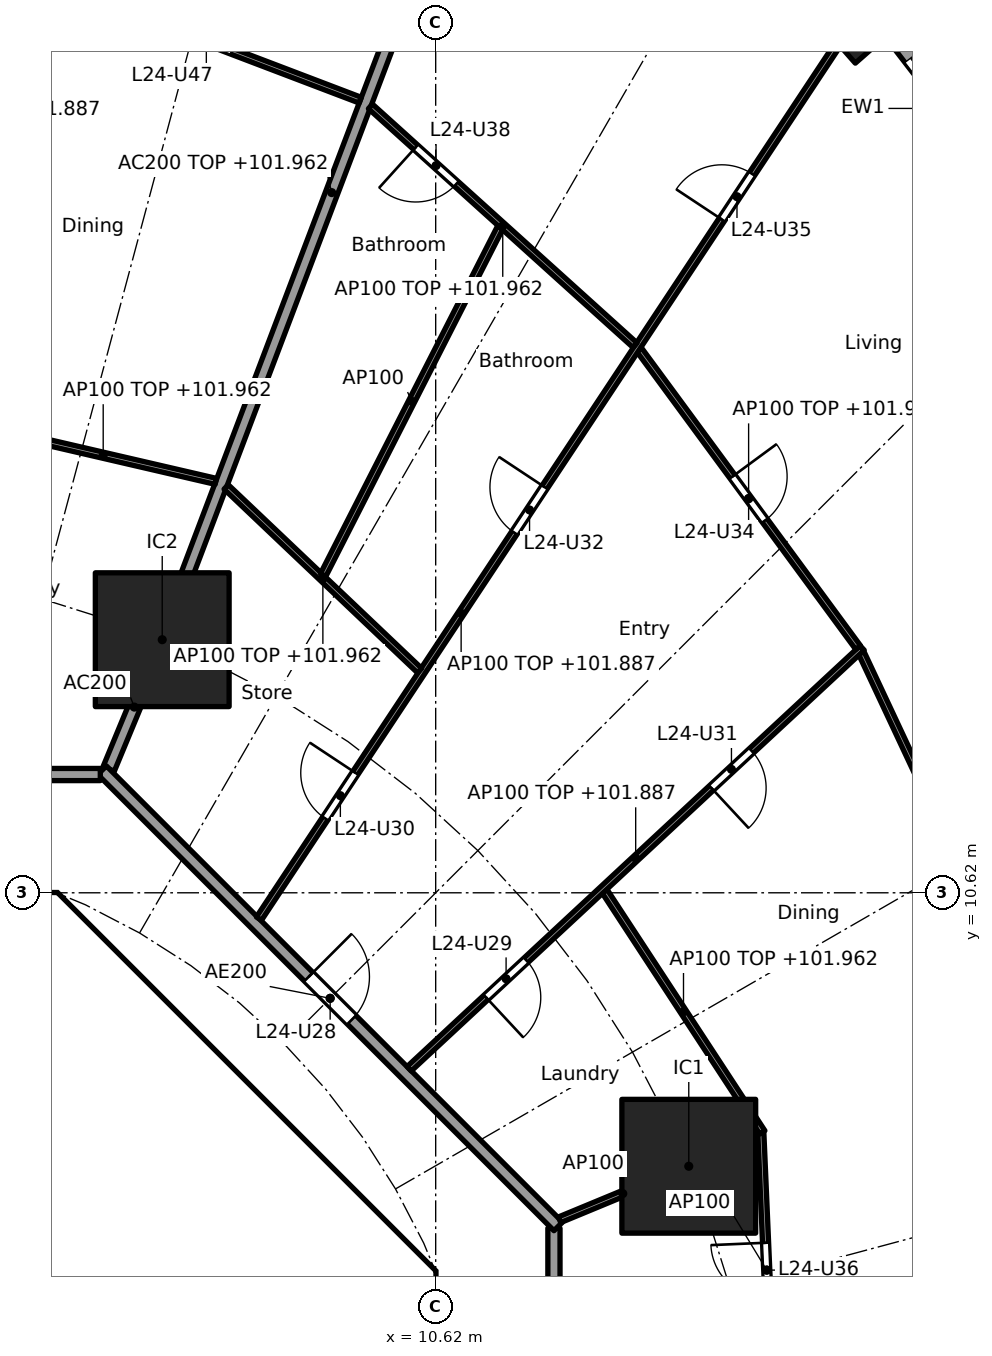
"""IFC4 building model, lengths in metres.
Left out: names, types, materials, properties, quantities, classifications, styles, units other than length and angle.
Written with IfcOpenShell. Run it as: python <this file> out.ifc"""

import sys

from ifc_helpers import new_model, si_unit, direction, frame, frame_2d, origin, origin_2d, place, context, subcontext, project, spatial, polyline, rectangle, hollow_rectangle, outline, extrude, element, fill, save


model = new_model("IFC4")
c1 = context("Model", 3, precision=1e-05, world=origin(), true_north=direction((0.0, 1.0)))
c2 = subcontext(c1, "Body", "Model", "MODEL_VIEW")
j1 = project(units=[si_unit("LENGTHUNIT", "METRE"), si_unit("PLANEANGLEUNIT", "RADIAN")], contexts=[c1])
p1 = place(None, origin())
s1 = spatial("IfcSite", under=j1, at=p1, CompositionType="ELEMENT")
p2 = place(p1, origin())
s2 = spatial("IfcBuilding", under=s1, at=p2, CompositionType="ELEMENT")
p3 = place(p2, frame((0.0, 0.0, 99.2)))
s3 = spatial("IfcBuildingStorey", under=s2, at=p3, CompositionType="ELEMENT", Elevation=99.2)
p4 = place(p3, frame((17.43, 25.049, 0.0), z_axis=(0.0, 0.0, 1.0), x_axis=(-0.660114607735, 0.751164898445, 0.0)))
e1 = element("IfcColumn", 1, at=p4, inside=s3, PredefinedType="COLUMN", context=c2, shape_type="SweptSolid", body=[
    extrude(hollow_rectangle(XDim=1.3, YDim=0.9, WallThickness=0.045, at=origin_2d()), origin(), (0.0, 0.0, 1.0), 3.7),
])
for number, where, z_axis, x_axis in (
    (2, (14.782, 6.123, 0.0), (0.0, 0.0, 1.0), (1.0, 0.0, 0.0)),
    (3, (6.123, 14.782, 0.0), (0.0, 0.0, 1.0), (1.0, 0.0, 0.0)),
):
    element("IfcColumn", number, at=place(p3, frame(where, z_axis=z_axis, x_axis=x_axis)), inside=s3, PredefinedType="COLUMN", context=c2, shape_type="SweptSolid", body=[
        extrude(rectangle(XDim=2.2, YDim=2.2, at=origin_2d()), origin(), (0.0, 0.0, 1.0), 3.7),
    ])
p5 = place(p3, frame((18.081, 24.811, 0.0), z_axis=(0.0, 0.0, 1.0), x_axis=(0.610458970322, -0.792047880847, 0.0)))
e4 = element("IfcWall", 4, at=p5, inside=s3, PredefinedType="SOLIDWALL", context=c2, shape_type="SweptSolid", body=[
    extrude(rectangle(XDim=3.263, YDim=0.25, at=frame_2d((1.631, 0.0))), origin(), (0.0, 0.0, 1.0), 3.44),
])
p6 = place(p5, frame((0.582, 0.0, 0.0)))
e5 = element("IfcOpeningElement", 5, at=p6, cuts=e4, PredefinedType="OPENING", context=c2, shape_type="SweptSolid", body=[
    extrude(rectangle(XDim=2.1, YDim=2.4, at=frame_2d((1.05, 1.2))), frame((0.0, 0.135, 0.0), z_axis=(0.0, -1.0, 0.0), x_axis=(1.0, 0.0, 0.0)), (0.0, 0.0, 1.0), 0.27),
])
p7 = place(p3, frame((9.988, 4.613, 0.0), z_axis=(0.0, 0.0, 1.0), x_axis=(-0.707106781187, 0.707106781187, 0.0)))
e6 = element("IfcWall", 6, at=p7, inside=s3, PredefinedType="SHEAR", context=c2, shape_type="SweptSolid", body=[
    extrude(rectangle(XDim=7.602, YDim=0.6, at=frame_2d((3.801, 0.0))), origin(), (0.0, 0.0, 1.0), 3.44),
])
p8 = place(p7, frame((3.201, 0.0, 0.0)))
e7 = element("IfcOpeningElement", 7, at=p8, cuts=e6, PredefinedType="OPENING", context=c2, shape_type="SweptSolid", body=[
    extrude(rectangle(XDim=1.2, YDim=2.1, at=frame_2d((0.6, 1.05))), frame((0.0, 0.31, 0.0), z_axis=(0.0, -1.0, 0.0), x_axis=(1.0, 0.0, 0.0)), (0.0, 0.0, 1.0), 0.62),
])
p9 = place(p3, origin())
e8 = element("IfcWall", 8, at=p9, inside=s3, PredefinedType="SHEAR", context=c2, shape_type="SweptSolid", body=[
    extrude(outline(polyline([(-4.152, 10.025), (-4.401, 9.776), (-4.825, 10.2), (-4.401, 10.625), (4.401, 10.625), (4.825, 10.2), (4.401, 9.776), (4.152, 10.025), (-4.152, 10.025)])), origin(), (0.0, 0.0, 1.0), 3.44),
])
p10 = place(p3, origin())
e9 = element("IfcWall", 9, at=p10, inside=s3, PredefinedType="SHEAR", context=c2, shape_type="SweptSolid", body=[
    extrude(outline(polyline([(9.776, -4.401), (10.025, -4.152), (10.025, -3.801), (10.025, 4.152), (9.776, 4.401), (10.2, 4.825), (10.625, 4.401), (10.625, -4.401), (10.2, -4.825), (9.776, -4.401)])), origin(), (0.0, 0.0, 1.0), 3.44),
])
p11 = place(p3, frame((5.243, 12.657, 0.0), z_axis=(0.0, 0.0, 1.0), x_axis=(0.382724096228, 0.923862687939, 0.0)))
e10 = element("IfcWall", 10, at=p11, inside=s3, PredefinedType="PARTITIONING", context=c2, shape_type="SweptSolid", body=[
    extrude(rectangle(XDim=2.201, YDim=0.2, at=frame_2d((1.1, 0.0))), origin(), (0.0, 0.0, 1.0), 3.44),
])
p12 = place(p3, frame((6.141, 14.829, 0.0), z_axis=(0.0, 0.0, 1.0), x_axis=(0.354477134193, 0.935064682968, 0.0)))
e11 = element("IfcWall", 11, at=p12, inside=s3, PredefinedType="PARTITIONING", context=c2, shape_type="SweptSolid", body=[
    extrude(rectangle(XDim=15.626, YDim=0.2, at=frame_2d((7.813, 0.0))), origin(), (0.0, 0.0, 1.0), 2.762),
])
p13 = place(p3, frame((12.565, -5.104, 0.0), z_axis=(0.0, 0.0, 1.0), x_axis=(0.0, 1.0, 0.0)))
e12 = element("IfcWall", 12, at=p13, inside=s3, PredefinedType="PARTITIONING", context=c2, shape_type="SweptSolid", body=[
    extrude(rectangle(XDim=10.209, YDim=0.2, at=frame_2d((5.104, 0.0))), origin(), (0.0, 0.0, 1.0), 3.44),
])
p14 = place(p3, frame((12.635, 5.134, 0.0), z_axis=(0.0, 0.0, 1.0), x_axis=(-0.707106781187, 0.707106781187, 0.0)))
e13 = element("IfcWall", 13, at=p14, inside=s3, PredefinedType="PARTITIONING", context=c2, shape_type="SweptSolid", body=[
    extrude(rectangle(XDim=10.609, YDim=0.2, at=frame_2d((5.305, 0.0))), origin(), (0.0, 0.0, 1.0), 3.44),
])
p15 = place(p14, frame((4.804, 0.0, 0.0)))
e14 = element("IfcOpeningElement", 14, at=p15, cuts=e13, PredefinedType="OPENING", context=c2, shape_type="SweptSolid", body=[
    extrude(rectangle(XDim=1.0, YDim=2.1, at=frame_2d((0.5, 1.05))), frame((0.0, 0.11, 0.0), z_axis=(0.0, -1.0, 0.0), x_axis=(1.0, 0.0, 0.0)), (0.0, 0.0, 1.0), 0.22),
])
p16 = place(p3, frame((5.104, 12.565, 0.0), z_axis=(0.0, 0.0, 1.0), x_axis=(-1.0, 0.0, 0.0)))
e15 = element("IfcWall", 15, at=p16, inside=s3, PredefinedType="PARTITIONING", context=c2, shape_type="SweptSolid", body=[
    extrude(rectangle(XDim=10.409, YDim=0.2, at=frame_2d((5.205, 0.0))), origin(), (0.0, 0.0, 1.0), 3.44),
])
p17 = place(p16, frame((4.604, 0.0, 0.0)))
e16 = element("IfcOpeningElement", 16, at=p17, cuts=e15, PredefinedType="OPENING", context=c2, shape_type="SweptSolid", body=[
    extrude(rectangle(XDim=1.0, YDim=2.1, at=frame_2d((0.5, 1.05))), frame((0.0, 0.11, 0.0), z_axis=(0.0, -1.0, 0.0), x_axis=(1.0, 0.0, 0.0)), (0.0, 0.0, 1.0), 0.22),
])
p18 = place(p3, frame((16.162, 2.158, 0.0), z_axis=(0.0, 0.0, 1.0), x_axis=(-0.043120653248, 0.999069872063, 0.0)))
e17 = element("IfcWall", 17, at=p18, inside=s3, PredefinedType="PARTITIONING", context=c2, shape_type="SweptSolid", body=[
    extrude(rectangle(XDim=4.518, YDim=0.1, at=frame_2d((2.259, 0.0))), origin(), (0.0, 0.0, 1.0), 3.44),
])
p19 = place(p18, frame((1.809, 0.0, 0.0)))
e18 = element("IfcOpeningElement", 18, at=p19, cuts=e17, PredefinedType="OPENING", context=c2, shape_type="SweptSolid", body=[
    extrude(rectangle(XDim=0.9, YDim=2.1, at=frame_2d((0.45, 1.05))), frame((0.0, 0.06, 0.0), z_axis=(0.0, -1.0, 0.0), x_axis=(1.0, 0.0, 0.0)), (0.0, 0.0, 1.0), 0.12),
])
p20 = place(p3, frame((12.657, 5.243, 0.0), z_axis=(0.0, 0.0, 1.0), x_axis=(0.923864733477, 0.382719158442, 0.0)))
e19 = element("IfcWall", 19, at=p20, inside=s3, PredefinedType="PARTITIONING", context=c2, shape_type="SweptSolid", body=[
    extrude(rectangle(XDim=2.25, YDim=0.1, at=frame_2d((1.125, 0.0))), origin(), (0.0, 0.0, 1.0), 3.44),
])
p21 = place(p3, frame((15.992, 6.68, 0.0), z_axis=(0.0, 0.0, 1.0), x_axis=(-0.547472878942, 0.836823426311, 0.0)))
e20 = element("IfcWall", 20, at=p21, inside=s3, PredefinedType="PARTITIONING", context=c2, shape_type="SweptSolid", body=[
    extrude(rectangle(XDim=4.738, YDim=0.1, at=frame_2d((2.369, 0.0))), origin(), (0.0, 0.0, 1.0), 2.762),
])
p22 = place(p3, frame((20.252, 8.95, 0.0), z_axis=(0.0, 0.0, 1.0), x_axis=(-0.424580052627, 0.90539040138, 0.0)))
e21 = element("IfcWall", 21, at=p22, inside=s3, PredefinedType="PARTITIONING", context=c2, shape_type="SweptSolid", body=[
    extrude(rectangle(XDim=6.204, YDim=0.1, at=frame_2d((3.102, 0.0))), origin(), (0.0, 0.0, 1.0), 2.762),
])
p23 = place(p3, frame((10.185, 7.726, 0.0), z_axis=(0.0, 0.0, 1.0), x_axis=(0.732598472978, 0.680661059112, 0.0)))
e22 = element("IfcWall", 22, at=p23, inside=s3, PredefinedType="PARTITIONING", context=c2, shape_type="SweptSolid", body=[
    extrude(rectangle(XDim=10.167, YDim=0.1, at=frame_2d((5.084, 0.0))), origin(), (0.0, 0.0, 1.0), 2.687),
])
p24 = place(p23, frame((1.725, 0.0, 0.0)))
e23 = element("IfcOpeningElement", 23, at=p24, cuts=e22, PredefinedType="OPENING", context=c2, shape_type="SweptSolid", body=[
    extrude(rectangle(XDim=0.9, YDim=2.1, at=frame_2d((0.45, 1.05))), frame((0.0, 0.06, 0.0), z_axis=(0.0, -1.0, 0.0), x_axis=(1.0, 0.0, 0.0)), (0.0, 0.0, 1.0), 0.12),
])
p25 = place(p23, frame((6.784, 0.0, 0.0)))
e24 = element("IfcOpeningElement", 24, at=p25, cuts=e22, PredefinedType="OPENING", context=c2, shape_type="SweptSolid", body=[
    extrude(rectangle(XDim=0.9, YDim=2.1, at=frame_2d((0.45, 1.05))), frame((0.0, 0.06, 0.0), z_axis=(0.0, -1.0, 0.0), x_axis=(1.0, 0.0, 0.0)), (0.0, 0.0, 1.0), 0.12),
])
p26 = place(p3, frame((17.567, 14.653, 0.0), z_axis=(0.0, 0.0, 1.0), x_axis=(-0.592391983588, 0.80564988536, 0.0)))
e25 = element("IfcWall", 25, at=p26, inside=s3, PredefinedType="PARTITIONING", context=c2, shape_type="SweptSolid", body=[
    extrude(rectangle(XDim=6.08, YDim=0.1, at=frame_2d((3.04, 0.0))), origin(), (0.0, 0.0, 1.0), 2.762),
])
p27 = place(p26, frame((2.59, 0.0, 0.0)))
e26 = element("IfcOpeningElement", 26, at=p27, cuts=e25, PredefinedType="OPENING", context=c2, shape_type="SweptSolid", body=[
    extrude(rectangle(XDim=0.9, YDim=2.1, at=frame_2d((0.45, 1.05))), frame((0.0, 0.06, 0.0), z_axis=(0.0, -1.0, 0.0), x_axis=(1.0, 0.0, 0.0)), (0.0, 0.0, 1.0), 0.12),
])
p28 = place(p3, frame((7.713, 10.195, 0.0), z_axis=(0.0, 0.0, 1.0), x_axis=(0.552111071171, 0.833770571015, 0.0)))
e27 = element("IfcWall", 27, at=p28, inside=s3, PredefinedType="PARTITIONING", context=c2, shape_type="SweptSolid", body=[
    extrude(rectangle(XDim=17.208, YDim=0.1, at=frame_2d((8.604, 0.0))), origin(), (0.0, 0.0, 1.0), 2.687),
])
p29 = place(p28, frame((1.976, 0.0, 0.0)))
e28 = element("IfcOpeningElement", 28, at=p29, cuts=e27, PredefinedType="OPENING", context=c2, shape_type="SweptSolid", body=[
    extrude(rectangle(XDim=0.9, YDim=2.1, at=frame_2d((0.45, 1.05))), frame((0.0, 0.06, 0.0), z_axis=(0.0, -1.0, 0.0), x_axis=(1.0, 0.0, 0.0)), (0.0, 0.0, 1.0), 0.12),
])
p30 = place(p28, frame((7.611, 0.0, 0.0)))
e29 = element("IfcOpeningElement", 29, at=p30, cuts=e27, PredefinedType="OPENING", context=c2, shape_type="SweptSolid", body=[
    extrude(rectangle(XDim=0.9, YDim=2.1, at=frame_2d((0.45, 1.05))), frame((0.0, 0.06, 0.0), z_axis=(0.0, -1.0, 0.0), x_axis=(1.0, 0.0, 0.0)), (0.0, 0.0, 1.0), 0.12),
])
p31 = place(p28, frame((13.79, 0.0, 0.0)))
e30 = element("IfcOpeningElement", 30, at=p31, cuts=e27, PredefinedType="OPENING", context=c2, shape_type="SweptSolid", body=[
    extrude(rectangle(XDim=0.9, YDim=2.1, at=frame_2d((0.45, 1.05))), frame((0.0, 0.06, 0.0), z_axis=(0.0, -1.0, 0.0), x_axis=(1.0, 0.0, 0.0)), (0.0, 0.0, 1.0), 0.12),
])
p32 = place(p3, frame((10.355, 14.274, 0.0), z_axis=(0.0, 0.0, 1.0), x_axis=(-0.725206433622, 0.688531501555, 0.0)))
e31 = element("IfcWall", 31, at=p32, inside=s3, PredefinedType="PARTITIONING", context=c2, shape_type="SweptSolid", body=[
    extrude(rectangle(XDim=4.387, YDim=0.1, at=frame_2d((2.193, 0.0))), origin(), (0.0, 0.0, 1.0), 2.762),
])
p33 = place(p3, frame((13.898, 19.625, 0.0), z_axis=(0.0, 0.0, 1.0), x_axis=(-0.742396654702, 0.669960601146, 0.0)))
e32 = element("IfcWall", 32, at=p33, inside=s3, PredefinedType="PARTITIONING", context=c2, shape_type="SweptSolid", body=[
    extrude(rectangle(XDim=5.861, YDim=0.1, at=frame_2d((2.931, 0.0))), origin(), (0.0, 0.0, 1.0), 2.762),
])
p34 = place(p33, frame((3.958, 0.0, 0.0)))
e33 = element("IfcOpeningElement", 33, at=p34, cuts=e32, PredefinedType="OPENING", context=c2, shape_type="SweptSolid", body=[
    extrude(rectangle(XDim=0.9, YDim=2.1, at=frame_2d((0.45, 1.05))), frame((0.0, 0.06, 0.0), z_axis=(0.0, -1.0, 0.0), x_axis=(1.0, 0.0, 0.0)), (0.0, 0.0, 1.0), 0.12),
])
p35 = place(p3, frame((8.769, 15.846, 0.0), z_axis=(0.0, 0.0, 1.0), x_axis=(0.454067187552, 0.890967445639, 0.0)))
e34 = element("IfcWall", 34, at=p35, inside=s3, PredefinedType="PARTITIONING", context=c2, shape_type="SweptSolid", body=[
    extrude(rectangle(XDim=6.414, YDim=0.1, at=frame_2d((3.207, 0.0))), origin(), (0.0, 0.0, 1.0), 3.44),
])
p36 = place(p3, frame((7.004, 17.386, 0.0), z_axis=(0.0, 0.0, 1.0), x_axis=(-0.974179728512, 0.225773905837, 0.0)))
e35 = element("IfcWall", 35, at=p36, inside=s3, PredefinedType="PARTITIONING", context=c2, shape_type="SweptSolid", body=[
    extrude(rectangle(XDim=3.802, YDim=0.1, at=frame_2d((1.901, 0.0))), origin(), (0.0, 0.0, 1.0), 2.762),
])
p37 = place(p3, frame((9.379, 23.655, 0.0), z_axis=(0.0, 0.0, 1.0), x_axis=(-0.934609369022, 0.355675873986, 0.0)))
e36 = element("IfcWall", 36, at=p37, inside=s3, PredefinedType="PARTITIONING", context=c2, shape_type="SweptSolid", body=[
    extrude(rectangle(XDim=5.467, YDim=0.1, at=frame_2d((2.733, 0.0))), origin(), (0.0, 0.0, 1.0), 2.762),
])
p38 = place(p37, frame((2.258, 0.0, 0.0)))
e37 = element("IfcOpeningElement", 37, at=p38, cuts=e36, PredefinedType="OPENING", context=c2, shape_type="SweptSolid", body=[
    extrude(rectangle(XDim=0.9, YDim=2.1, at=frame_2d((0.45, 1.05))), frame((0.0, 0.06, 0.0), z_axis=(0.0, -1.0, 0.0), x_axis=(1.0, 0.0, 0.0)), (0.0, 0.0, 1.0), 0.12),
])
p39 = place(p6, origin())
e38 = element("IfcDoor", 38, at=p39, inside=s3, OperationType="SLIDING_TO_LEFT", PredefinedType="DOOR", context=c2, shape_type="SweptSolid", body=[
    extrude(rectangle(XDim=2.1, YDim=2.4, at=frame_2d((1.05, 1.2))), frame((0.0, 0.025, 0.0), z_axis=(0.0, -1.0, 0.0), x_axis=(1.0, 0.0, 0.0)), (0.0, 0.0, 1.0), 0.05),
])
fill(e5, e38)
p40 = place(p8, origin())
e39 = element("IfcDoor", 39, at=p40, inside=s3, OperationType="SINGLE_SWING_LEFT", PredefinedType="DOOR", context=c2, shape_type="SweptSolid", body=[
    extrude(rectangle(XDim=1.2, YDim=2.1, at=frame_2d((0.6, 1.05))), frame((0.0, 0.025, 0.0), z_axis=(0.0, -1.0, 0.0), x_axis=(1.0, 0.0, 0.0)), (0.0, 0.0, 1.0), 0.05),
])
fill(e7, e39)
p41 = place(p15, frame((1.0, 0.0, 0.0), x_axis=(-1.0, 0.0, 0.0)))
e40 = element("IfcDoor", 40, at=p41, inside=s3, OperationType="SINGLE_SWING_LEFT", PredefinedType="DOOR", context=c2, shape_type="SweptSolid", body=[
    extrude(rectangle(XDim=1.0, YDim=2.1, at=frame_2d((0.5, 1.05))), frame((0.0, 0.025, 0.0), z_axis=(0.0, -1.0, 0.0), x_axis=(1.0, 0.0, 0.0)), (0.0, 0.0, 1.0), 0.05),
])
fill(e14, e40)
p42 = place(p24, frame((0.9, 0.0, 0.0), x_axis=(-1.0, 0.0, 0.0)))
e41 = element("IfcDoor", 41, at=p42, inside=s3, OperationType="SINGLE_SWING_RIGHT", PredefinedType="DOOR", context=c2, shape_type="SweptSolid", body=[
    extrude(rectangle(XDim=0.9, YDim=2.1, at=frame_2d((0.45, 1.05))), frame((0.0, 0.025, 0.0), z_axis=(0.0, -1.0, 0.0), x_axis=(1.0, 0.0, 0.0)), (0.0, 0.0, 1.0), 0.05),
])
fill(e23, e41)
p43 = place(p29, origin())
e42 = element("IfcDoor", 42, at=p43, inside=s3, OperationType="SINGLE_SWING_RIGHT", PredefinedType="DOOR", context=c2, shape_type="SweptSolid", body=[
    extrude(rectangle(XDim=0.9, YDim=2.1, at=frame_2d((0.45, 1.05))), frame((0.0, 0.025, 0.0), z_axis=(0.0, -1.0, 0.0), x_axis=(1.0, 0.0, 0.0)), (0.0, 0.0, 1.0), 0.05),
])
fill(e28, e42)
p44 = place(p25, frame((0.9, 0.0, 0.0), x_axis=(-1.0, 0.0, 0.0)))
e43 = element("IfcDoor", 43, at=p44, inside=s3, OperationType="SINGLE_SWING_RIGHT", PredefinedType="DOOR", context=c2, shape_type="SweptSolid", body=[
    extrude(rectangle(XDim=0.9, YDim=2.1, at=frame_2d((0.45, 1.05))), frame((0.0, 0.025, 0.0), z_axis=(0.0, -1.0, 0.0), x_axis=(1.0, 0.0, 0.0)), (0.0, 0.0, 1.0), 0.05),
])
fill(e24, e43)
p45 = place(p30, origin())
e44 = element("IfcDoor", 44, at=p45, inside=s3, OperationType="SINGLE_SWING_RIGHT", PredefinedType="DOOR", context=c2, shape_type="SweptSolid", body=[
    extrude(rectangle(XDim=0.9, YDim=2.1, at=frame_2d((0.45, 1.05))), frame((0.0, 0.025, 0.0), z_axis=(0.0, -1.0, 0.0), x_axis=(1.0, 0.0, 0.0)), (0.0, 0.0, 1.0), 0.05),
])
fill(e29, e44)
p46 = place(p27, frame((0.9, 0.0, 0.0), x_axis=(-1.0, 0.0, 0.0)))
e45 = element("IfcDoor", 45, at=p46, inside=s3, OperationType="SINGLE_SWING_LEFT", PredefinedType="DOOR", context=c2, shape_type="SweptSolid", body=[
    extrude(rectangle(XDim=0.9, YDim=2.1, at=frame_2d((0.45, 1.05))), frame((0.0, 0.025, 0.0), z_axis=(0.0, -1.0, 0.0), x_axis=(1.0, 0.0, 0.0)), (0.0, 0.0, 1.0), 0.05),
])
fill(e26, e45)
p47 = place(p31, origin())
e46 = element("IfcDoor", 46, at=p47, inside=s3, OperationType="SINGLE_SWING_LEFT", PredefinedType="DOOR", context=c2, shape_type="SweptSolid", body=[
    extrude(rectangle(XDim=0.9, YDim=2.1, at=frame_2d((0.45, 1.05))), frame((0.0, 0.025, 0.0), z_axis=(0.0, -1.0, 0.0), x_axis=(1.0, 0.0, 0.0)), (0.0, 0.0, 1.0), 0.05),
])
fill(e30, e46)
p48 = place(p19, origin())
e47 = element("IfcDoor", 47, at=p48, inside=s3, OperationType="SINGLE_SWING_RIGHT", PredefinedType="DOOR", context=c2, shape_type="SweptSolid", body=[
    extrude(rectangle(XDim=0.9, YDim=2.1, at=frame_2d((0.45, 1.05))), frame((0.0, 0.025, 0.0), z_axis=(0.0, -1.0, 0.0), x_axis=(1.0, 0.0, 0.0)), (0.0, 0.0, 1.0), 0.05),
])
fill(e18, e47)
p49 = place(p34, origin())
e48 = element("IfcDoor", 48, at=p49, inside=s3, OperationType="SINGLE_SWING_RIGHT", PredefinedType="DOOR", context=c2, shape_type="SweptSolid", body=[
    extrude(rectangle(XDim=0.9, YDim=2.1, at=frame_2d((0.45, 1.05))), frame((0.0, 0.025, 0.0), z_axis=(0.0, -1.0, 0.0), x_axis=(1.0, 0.0, 0.0)), (0.0, 0.0, 1.0), 0.05),
])
fill(e33, e48)
p50 = place(p38, frame((0.9, 0.0, 0.0), x_axis=(-1.0, 0.0, 0.0)))
e49 = element("IfcDoor", 49, at=p50, inside=s3, OperationType="SINGLE_SWING_RIGHT", PredefinedType="DOOR", context=c2, shape_type="SweptSolid", body=[
    extrude(rectangle(XDim=0.9, YDim=2.1, at=frame_2d((0.45, 1.05))), frame((0.0, 0.025, 0.0), z_axis=(0.0, -1.0, 0.0), x_axis=(1.0, 0.0, 0.0)), (0.0, 0.0, 1.0), 0.05),
])
fill(e37, e49)
save(model, sys.argv[1])
